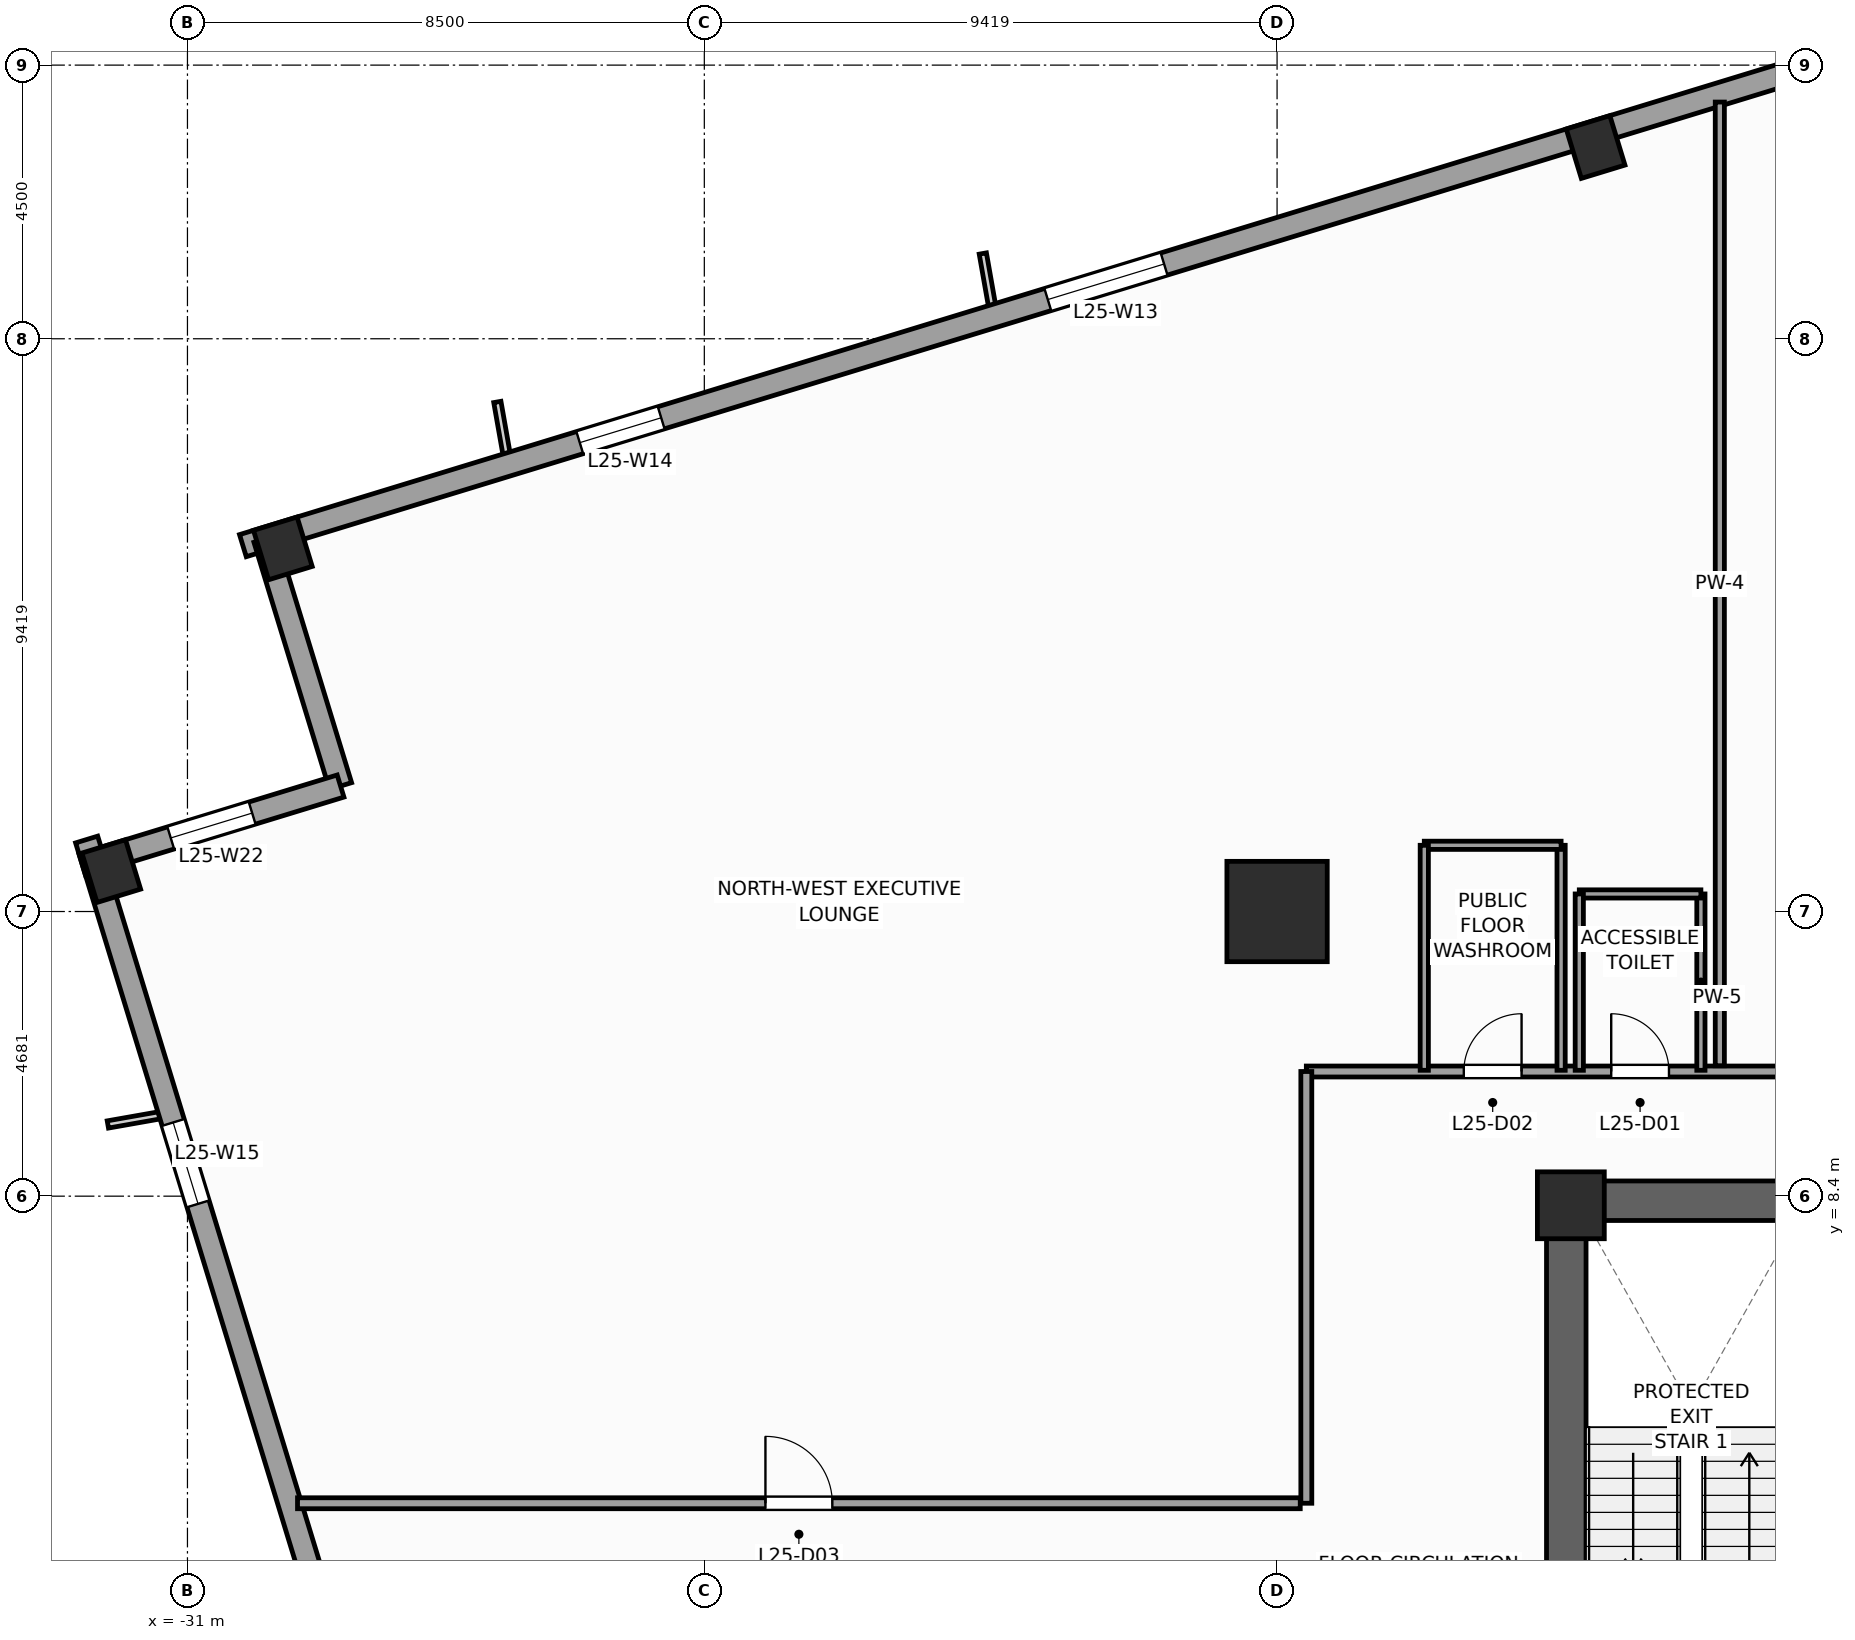
"""IFC4 building model, lengths in metres.
Left out: names, types, materials, properties, quantities, classifications, styles, units other than length and angle.
Written with IfcOpenShell. Run it as: python <this file> out.ifc"""

import sys

from ifc_helpers import new_model, si_unit, direction, frame, frame_2d, origin, origin_2d, place, context, subcontext, project, spatial, rectangle, extrude, source, transform, mapped, element, fill, save


model = new_model("IFC4")
c1 = context("Model", 3, precision=1e-05, world=origin(), true_north=direction((0.0, 1.0)))
c2 = subcontext(c1, "Body", "Model", "MODEL_VIEW")
j1 = project(units=[si_unit("LENGTHUNIT", "METRE"), si_unit("PLANEANGLEUNIT", "RADIAN")], contexts=[c1])
p1 = place(None, origin())
s1 = spatial("IfcSite", under=j1, at=p1, CompositionType="ELEMENT")
p2 = place(p1, origin())
s2 = spatial("IfcBuilding", under=s1, at=p2, CompositionType="ELEMENT")
p3 = place(p2, frame((0.0, 0.0, 107.2)))
s3 = spatial("IfcBuildingStorey", under=s2, at=p3, CompositionType="ELEMENT", Elevation=107.2)
p4 = place(p3, frame((-8.65, 8.325, 0.0), z_axis=(0.0, 0.0, 1.0), x_axis=(1.0, 0.0, 0.0)))
e1 = element("IfcWall", 1, at=p4, inside=s3, PredefinedType="SHEAR", context=c2, shape_type="SweptSolid", body=[
    extrude(rectangle(XDim=17.3, YDim=0.65, at=frame_2d((8.65, 0.0))), origin(), (0.0, 0.0, 1.0), 4.0),
])
p5 = place(p3, frame((-8.325, -8.0, 0.0), z_axis=(0.0, 0.0, 1.0), x_axis=(0.0, 1.0, 0.0)))
e2 = element("IfcWall", 2, at=p5, inside=s3, PredefinedType="SHEAR", context=c2, shape_type="SweptSolid", body=[
    extrude(rectangle(XDim=16.0, YDim=0.65, at=frame_2d((8.0, 0.0))), origin(), (0.0, 0.0, 1.0), 4.0),
])
p6 = place(p5, frame((4.69, 0.0, 0.0)))
e3 = element("IfcOpeningElement", 3, at=p6, cuts=e2, PredefinedType="OPENING", context=c2, shape_type="SweptSolid", body=[
    extrude(rectangle(XDim=1.3, YDim=2.2, at=frame_2d((0.65, 1.1))), frame((0.0, 0.335, 0.0), z_axis=(0.0, -1.0, 0.0), x_axis=(1.0, 0.0, 0.0)), (0.0, 0.0, 1.0), 0.67),
])
m1 = source(origin(), c2, "Body", "SweptSolid", [
    extrude(rectangle(XDim=1.1, YDim=1.1, at=origin_2d()), origin(), (0.0, 0.0, 1.0), 4.0),
])
p7 = place(p3, frame((-8.25, 8.25, 0.0), z_axis=(0.0, 0.0, 1.0), x_axis=(1.0, 0.0, 0.0)))
e4 = element("IfcColumn", 4, at=p7, inside=s3, PredefinedType="PILASTER", context=c2, shape_type="MappedRepresentation", body=[
    mapped(m1, transform((0.0, 0.0, 0.0), scale=1.0)),
])
m2 = source(origin(), c2, "Body", "SweptSolid", [
    extrude(rectangle(XDim=1.65, YDim=1.65, at=origin_2d()), origin(), (0.0, 0.0, 1.0), 4.0),
])
p8 = place(p3, frame((-13.081, 13.081, 0.0), z_axis=(0.0, 0.0, 1.0), x_axis=(1.0, 0.0, 0.0)))
e5 = element("IfcColumn", 5, at=p8, inside=s3, PredefinedType="COLUMN", context=c2, shape_type="MappedRepresentation", body=[
    mapped(m2, transform((0.0, 0.0, 0.0), scale=1.0)),
])
m3 = source(origin(), c2, "Body", "SweptSolid", [
    extrude(rectangle(XDim=0.75, YDim=0.85, at=origin_2d()), origin(), (0.0, 0.0, 1.0), 4.0),
])
for number, where, z_axis, x_axis in (
    (6, (-7.843, 25.653, 0.0), (0.0, 0.0, 1.0), (0.956, 0.292, 0.0)),
    (7, (-29.431, 19.052, 0.0), (0.0, 0.0, 1.0), (0.956, 0.292, 0.0)),
    (8, (-32.253, 13.746, 0.0), (0.0, 0.0, 1.0), (0.956, 0.292, 0.0)),
):
    element("IfcColumn", number, at=place(p3, frame(where, z_axis=z_axis, x_axis=x_axis)), inside=s3, PredefinedType="COLUMN", context=c2, shape_type="MappedRepresentation", body=[
        mapped(m3, transform((0.0, 0.0, 0.0), scale=1.0)),
    ])
p9 = place(p3, frame((14.265, 32.658, 0.0), z_axis=(0.0, 0.0, 1.0), x_axis=(-0.956304320851, -0.292373127906, 0.0)))
e9 = element("IfcWall", 9, at=p9, inside=s3, PredefinedType="STANDARD", context=c2, shape_type="SweptSolid", body=[
    extrude(rectangle(XDim=46.38, YDim=0.38, at=frame_2d((23.19, 0.0))), origin(), (0.0, 0.0, 1.0), 3.14),
])
p10 = place(p9, frame((4.865, 0.0, 0.51)))
e10 = element("IfcOpeningElement", 10, at=p10, cuts=e9, PredefinedType="OPENING", context=c2, shape_type="SweptSolid", body=[
    extrude(rectangle(XDim=1.4, YDim=2.4, at=frame_2d((0.7, 1.2))), frame((0.0, 0.2, 0.0), z_axis=(0.0, -1.0, 0.0), x_axis=(1.0, 0.0, 0.0)), (0.0, 0.0, 1.0), 0.4),
])
p11 = place(p9, frame((12.45, 0.0, 0.51)))
e11 = element("IfcOpeningElement", 11, at=p11, cuts=e9, PredefinedType="OPENING", context=c2, shape_type="SweptSolid", body=[
    extrude(rectangle(XDim=2.0, YDim=2.4, at=frame_2d((1.0, 1.2))), frame((0.0, 0.2, 0.0), z_axis=(0.0, -1.0, 0.0), x_axis=(1.0, 0.0, 0.0)), (0.0, 0.0, 1.0), 0.4),
])
p12 = place(p9, frame((30.538, 0.0, 0.51)))
e12 = element("IfcOpeningElement", 12, at=p12, cuts=e9, PredefinedType="OPENING", context=c2, shape_type="SweptSolid", body=[
    extrude(rectangle(XDim=2.0, YDim=2.4, at=frame_2d((1.0, 1.2))), frame((0.0, 0.2, 0.0), z_axis=(0.0, -1.0, 0.0), x_axis=(1.0, 0.0, 0.0)), (0.0, 0.0, 1.0), 0.4),
])
p13 = place(p9, frame((39.187, 0.0, 0.51)))
e13 = element("IfcOpeningElement", 13, at=p13, cuts=e9, PredefinedType="OPENING", context=c2, shape_type="SweptSolid", body=[
    extrude(rectangle(XDim=1.4, YDim=2.4, at=frame_2d((0.7, 1.2))), frame((0.0, 0.2, 0.0), z_axis=(0.0, -1.0, 0.0), x_axis=(1.0, 0.0, 0.0)), (0.0, 0.0, 1.0), 0.4),
])
p14 = place(p3, frame((-29.725, 19.208, 0.0), z_axis=(0.0, 0.0, 1.0), x_axis=(0.292345507338, -0.956312764915, 0.0)))
e14 = element("IfcWall", 14, at=p14, inside=s3, PredefinedType="STANDARD", context=c2, shape_type="SweptSolid", body=[
    extrude(rectangle(XDim=4.25, YDim=0.38, at=frame_2d((2.125, 0.0))), origin(), (0.0, 0.0, 1.0), 3.74),
])
p15 = place(p3, frame((-28.482, 15.144, 0.0), z_axis=(0.0, 0.0, 1.0), x_axis=(-0.956304176051, -0.292373601522, 0.0)))
e15 = element("IfcWall", 15, at=p15, inside=s3, PredefinedType="STANDARD", context=c2, shape_type="SweptSolid", body=[
    extrude(rectangle(XDim=4.44, YDim=0.38, at=frame_2d((2.22, 0.0))), origin(), (0.0, 0.0, 1.0), 3.04),
])
p16 = place(p15, frame((1.52, 0.0, 0.51)))
e16 = element("IfcOpeningElement", 16, at=p16, cuts=e15, PredefinedType="OPENING", context=c2, shape_type="SweptSolid", body=[
    extrude(rectangle(XDim=1.4, YDim=2.4, at=frame_2d((0.7, 1.2))), frame((0.0, 0.2, 0.0), z_axis=(0.0, -1.0, 0.0), x_axis=(1.0, 0.0, 0.0)), (0.0, 0.0, 1.0), 0.4),
])
p17 = place(p3, frame((-32.658, 14.265, 0.0), z_axis=(0.0, 0.0, 1.0), x_axis=(0.292373127906, -0.956304320851, 0.0)))
e17 = element("IfcWall", 17, at=p17, inside=s3, PredefinedType="STANDARD", context=c2, shape_type="SweptSolid", body=[
    extrude(rectangle(XDim=46.38, YDim=0.38, at=frame_2d((23.19, 0.0))), origin(), (0.0, 0.0, 1.0), 3.14),
])
p18 = place(p17, frame((29.115, 0.0, 0.0)))
e18 = element("IfcOpeningElement", 18, at=p18, cuts=e17, PredefinedType="OPENING", context=c2, shape_type="SweptSolid", body=[
    extrude(rectangle(XDim=1.05, YDim=2.25, at=frame_2d((0.525, 1.125))), frame((0.0, 0.2, 0.0), z_axis=(0.0, -1.0, 0.0), x_axis=(1.0, 0.0, 0.0)), (0.0, 0.0, 1.0), 0.4),
])
p19 = place(p17, frame((4.865, 0.0, 0.51)))
e19 = element("IfcOpeningElement", 19, at=p19, cuts=e17, PredefinedType="OPENING", context=c2, shape_type="SweptSolid", body=[
    extrude(rectangle(XDim=1.4, YDim=2.4, at=frame_2d((0.7, 1.2))), frame((0.0, 0.2, 0.0), z_axis=(0.0, -1.0, 0.0), x_axis=(1.0, 0.0, 0.0)), (0.0, 0.0, 1.0), 0.4),
])
p20 = place(p17, frame((14.7, 0.0, 0.51)))
e20 = element("IfcOpeningElement", 20, at=p20, cuts=e17, PredefinedType="OPENING", context=c2, shape_type="SweptSolid", body=[
    extrude(rectangle(XDim=2.0, YDim=2.4, at=frame_2d((1.0, 1.2))), frame((0.0, 0.2, 0.0), z_axis=(0.0, -1.0, 0.0), x_axis=(1.0, 0.0, 0.0)), (0.0, 0.0, 1.0), 0.4),
])
p21 = place(p17, frame((19.012, 0.0, 0.51)))
e21 = element("IfcOpeningElement", 21, at=p21, cuts=e17, PredefinedType="OPENING", context=c2, shape_type="SweptSolid", body=[
    extrude(rectangle(XDim=2.0, YDim=2.4, at=frame_2d((1.0, 1.2))), frame((0.0, 0.2, 0.0), z_axis=(0.0, -1.0, 0.0), x_axis=(1.0, 0.0, 0.0)), (0.0, 0.0, 1.0), 0.4),
])
p22 = place(p17, frame((31.288, 0.0, 0.51)))
e22 = element("IfcOpeningElement", 22, at=p22, cuts=e17, PredefinedType="OPENING", context=c2, shape_type="SweptSolid", body=[
    extrude(rectangle(XDim=2.0, YDim=2.4, at=frame_2d((1.0, 1.2))), frame((0.0, 0.2, 0.0), z_axis=(0.0, -1.0, 0.0), x_axis=(1.0, 0.0, 0.0)), (0.0, 0.0, 1.0), 0.4),
])
p23 = place(p17, frame((39.187, 0.0, 0.51)))
e23 = element("IfcOpeningElement", 23, at=p23, cuts=e17, PredefinedType="OPENING", context=c2, shape_type="SweptSolid", body=[
    extrude(rectangle(XDim=1.4, YDim=2.4, at=frame_2d((0.7, 1.2))), frame((0.0, 0.2, 0.0), z_axis=(0.0, -1.0, 0.0), x_axis=(1.0, 0.0, 0.0)), (0.0, 0.0, 1.0), 0.4),
])
p24 = place(p3, frame((-12.6, 10.45, 0.0), z_axis=(0.0, 0.0, 1.0), x_axis=(1.0, 0.0, 0.0)))
e24 = element("IfcWall", 24, at=p24, inside=s3, PredefinedType="PARTITIONING", context=c2, shape_type="SweptSolid", body=[
    extrude(rectangle(XDim=25.2, YDim=0.18, at=frame_2d((12.6, 0.0))), origin(), (0.0, 0.0, 1.0), 3.74),
])
p25 = place(p24, frame((5.014, 0.0, 0.0)))
e25 = element("IfcOpeningElement", 25, at=p25, cuts=e24, PredefinedType="OPENING", context=c2, shape_type="SweptSolid", body=[
    extrude(rectangle(XDim=0.95, YDim=2.1, at=frame_2d((0.475, 1.05))), frame((0.0, 0.1, 0.0), z_axis=(0.0, -1.0, 0.0), x_axis=(1.0, 0.0, 0.0)), (0.0, 0.0, 1.0), 0.2),
])
p26 = place(p24, frame((2.59, 0.0, 0.0)))
e26 = element("IfcOpeningElement", 26, at=p26, cuts=e24, PredefinedType="OPENING", context=c2, shape_type="SweptSolid", body=[
    extrude(rectangle(XDim=0.95, YDim=2.1, at=frame_2d((0.475, 1.05))), frame((0.0, 0.1, 0.0), z_axis=(0.0, -1.0, 0.0), x_axis=(1.0, 0.0, 0.0)), (0.0, 0.0, 1.0), 0.2),
])
p27 = place(p24, frame((12.05, 0.0, 0.0)))
e27 = element("IfcOpeningElement", 27, at=p27, cuts=e24, PredefinedType="OPENING", context=c2, shape_type="SweptSolid", body=[
    extrude(rectangle(XDim=1.1, YDim=2.2, at=frame_2d((0.55, 1.1))), frame((0.0, 0.1, 0.0), z_axis=(0.0, -1.0, 0.0), x_axis=(1.0, 0.0, 0.0)), (0.0, 0.0, 1.0), 0.2),
])
p28 = place(p3, frame((-12.6, 3.35, 0.0), z_axis=(0.0, 0.0, 1.0), x_axis=(0.0, 1.0, 0.0)))
e28 = element("IfcWall", 28, at=p28, inside=s3, PredefinedType="PARTITIONING", context=c2, shape_type="SweptSolid", body=[
    extrude(rectangle(XDim=7.1, YDim=0.18, at=frame_2d((3.55, 0.0))), origin(), (0.0, 0.0, 1.0), 3.74),
])
p29 = place(p3, frame((-29.19, 3.35, 0.0), z_axis=(0.0, 0.0, 1.0), x_axis=(1.0, 0.0, 0.0)))
e29 = element("IfcWall", 29, at=p29, inside=s3, PredefinedType="PARTITIONING", context=c2, shape_type="SweptSolid", body=[
    extrude(rectangle(XDim=16.49, YDim=0.18, at=frame_2d((8.245, 0.0))), origin(), (0.0, 0.0, 1.0), 3.74),
])
p30 = place(p29, frame((7.695, 0.0, 0.0)))
e30 = element("IfcOpeningElement", 30, at=p30, cuts=e29, PredefinedType="OPENING", context=c2, shape_type="SweptSolid", body=[
    extrude(rectangle(XDim=1.1, YDim=2.2, at=frame_2d((0.55, 1.1))), frame((0.0, 0.1, 0.0), z_axis=(0.0, -1.0, 0.0), x_axis=(1.0, 0.0, 0.0)), (0.0, 0.0, 1.0), 0.2),
])
p31 = place(p3, frame((-5.8, 10.545, 0.0), z_axis=(0.0, 0.0, 1.0), x_axis=(0.0, 1.0, 0.0)))
e31 = element("IfcWall", 31, at=p31, inside=s3, PredefinedType="PARTITIONING", context=c2, shape_type="SweptSolid", body=[
    extrude(rectangle(XDim=15.848, YDim=0.15, at=frame_2d((7.924, 0.0))), origin(), (0.0, 0.0, 1.0), 3.74),
])
p32 = place(p3, frame((-6.111, 10.47, 0.0), z_axis=(0.0, 0.0, 1.0), x_axis=(0.0, 1.0, 0.0)))
e32 = element("IfcWall", 32, at=p32, inside=s3, PredefinedType="PARTITIONING", context=c2, shape_type="SweptSolid", body=[
    extrude(rectangle(XDim=2.9, YDim=0.135, at=frame_2d((1.45, 0.0))), origin(), (0.0, 0.0, 1.0), 3.74),
])
p33 = place(p3, frame((-8.111, 13.37, 0.0), z_axis=(0.0, 0.0, 1.0), x_axis=(1.0, 0.0, 0.0)))
e33 = element("IfcWall", 33, at=p33, inside=s3, PredefinedType="PARTITIONING", context=c2, shape_type="SweptSolid", body=[
    extrude(rectangle(XDim=2.0, YDim=0.135, at=frame_2d((1.0, 0.0))), origin(), (0.0, 0.0, 1.0), 2.732),
])
p34 = place(p3, frame((-8.111, 10.47, 0.0), z_axis=(0.0, 0.0, 1.0), x_axis=(0.0, 1.0, 0.0)))
e34 = element("IfcWall", 34, at=p34, inside=s3, PredefinedType="PARTITIONING", context=c2, shape_type="SweptSolid", body=[
    extrude(rectangle(XDim=2.9, YDim=0.135, at=frame_2d((1.45, 0.0))), origin(), (0.0, 0.0, 1.0), 3.74),
])
p35 = place(p3, frame((-8.41, 10.47, 0.0), z_axis=(0.0, 0.0, 1.0), x_axis=(0.0, 1.0, 0.0)))
e35 = element("IfcWall", 35, at=p35, inside=s3, PredefinedType="PARTITIONING", context=c2, shape_type="SweptSolid", body=[
    extrude(rectangle(XDim=3.7, YDim=0.135, at=frame_2d((1.85, 0.0))), origin(), (0.0, 0.0, 1.0), 3.74),
])
p36 = place(p3, frame((-10.66, 14.17, 0.0), z_axis=(0.0, 0.0, 1.0), x_axis=(1.0, 0.0, 0.0)))
e36 = element("IfcWall", 36, at=p36, inside=s3, PredefinedType="PARTITIONING", context=c2, shape_type="SweptSolid", body=[
    extrude(rectangle(XDim=2.25, YDim=0.135, at=frame_2d((1.125, 0.0))), origin(), (0.0, 0.0, 1.0), 3.74),
])
p37 = place(p3, frame((-10.66, 10.47, 0.0), z_axis=(0.0, 0.0, 1.0), x_axis=(0.0, 1.0, 0.0)))
e37 = element("IfcWall", 37, at=p37, inside=s3, PredefinedType="PARTITIONING", context=c2, shape_type="SweptSolid", body=[
    extrude(rectangle(XDim=3.7, YDim=0.135, at=frame_2d((1.85, 0.0))), origin(), (0.0, 0.0, 1.0), 3.74),
])
m4 = source(origin(), c2, "Body", "SweptSolid", [
    extrude(rectangle(XDim=2.0, YDim=2.4, at=frame_2d((1.0, 1.2))), frame((0.0, 0.03, 0.0), z_axis=(0.0, -1.0, 0.0), x_axis=(1.0, 0.0, 0.0)), (0.0, 0.0, 1.0), 0.06),
])
p38 = place(p12, origin())
e38 = element("IfcWindow", 38, at=p38, inside=s3, PartitioningType="SINGLE_PANEL", PredefinedType="WINDOW", context=c2, shape_type="MappedRepresentation", body=[
    mapped(m4, transform((0.0, 0.0, 0.0), scale=1.0)),
])
fill(e12, e38)
m5 = source(origin(), c2, "Body", "SweptSolid", [
    extrude(rectangle(XDim=1.4, YDim=2.4, at=frame_2d((0.7, 1.2))), frame((0.0, 0.03, 0.0), z_axis=(0.0, -1.0, 0.0), x_axis=(1.0, 0.0, 0.0)), (0.0, 0.0, 1.0), 0.06),
])
p39 = place(p13, origin())
e39 = element("IfcWindow", 39, at=p39, inside=s3, PartitioningType="SINGLE_PANEL", PredefinedType="WINDOW", context=c2, shape_type="MappedRepresentation", body=[
    mapped(m5, transform((0.0, 0.0, 0.0), scale=1.0)),
])
fill(e13, e39)
p40 = place(p19, origin())
e40 = element("IfcWindow", 40, at=p40, inside=s3, PartitioningType="SINGLE_PANEL", PredefinedType="WINDOW", context=c2, shape_type="MappedRepresentation", body=[
    mapped(m5, transform((0.0, 0.0, 0.0), scale=1.0)),
])
fill(e19, e40)
p41 = place(p16, origin())
e41 = element("IfcWindow", 41, at=p41, inside=s3, PartitioningType="SINGLE_PANEL", PredefinedType="WINDOW", context=c2, shape_type="MappedRepresentation", body=[
    mapped(m5, transform((0.0, 0.0, 0.0), scale=1.0)),
])
fill(e16, e41)
m6 = source(origin(), c2, "Body", "SweptSolid", [
    extrude(rectangle(XDim=0.95, YDim=2.1, at=frame_2d((0.475, 1.05))), frame((0.0, 0.025, 0.0), z_axis=(0.0, -1.0, 0.0), x_axis=(1.0, 0.0, 0.0)), (0.0, 0.0, 1.0), 0.05),
])
p42 = place(p25, origin())
e42 = element("IfcDoor", 42, at=p42, inside=s3, OperationType="SINGLE_SWING_LEFT", PredefinedType="DOOR", context=c2, shape_type="MappedRepresentation", body=[
    mapped(m6, transform((0.0, 0.0, 0.0), scale=1.0)),
])
fill(e25, e42)
p43 = place(p26, origin())
e43 = element("IfcDoor", 43, at=p43, inside=s3, OperationType="SINGLE_SWING_RIGHT", PredefinedType="DOOR", context=c2, shape_type="MappedRepresentation", body=[
    mapped(m6, transform((0.0, 0.0, 0.0), scale=1.0)),
])
fill(e26, e43)
m7 = source(origin(), c2, "Body", "SweptSolid", [
    extrude(rectangle(XDim=1.1, YDim=2.2, at=frame_2d((0.55, 1.1))), frame((0.0, 0.025, 0.0), z_axis=(0.0, -1.0, 0.0), x_axis=(1.0, 0.0, 0.0)), (0.0, 0.0, 1.0), 0.05),
])
p44 = place(p30, origin())
e44 = element("IfcDoor", 44, at=p44, inside=s3, OperationType="SINGLE_SWING_LEFT", PredefinedType="DOOR", context=c2, shape_type="MappedRepresentation", body=[
    mapped(m7, transform((0.0, 0.0, 0.0), scale=1.0)),
])
fill(e30, e44)
save(model, sys.argv[1])
